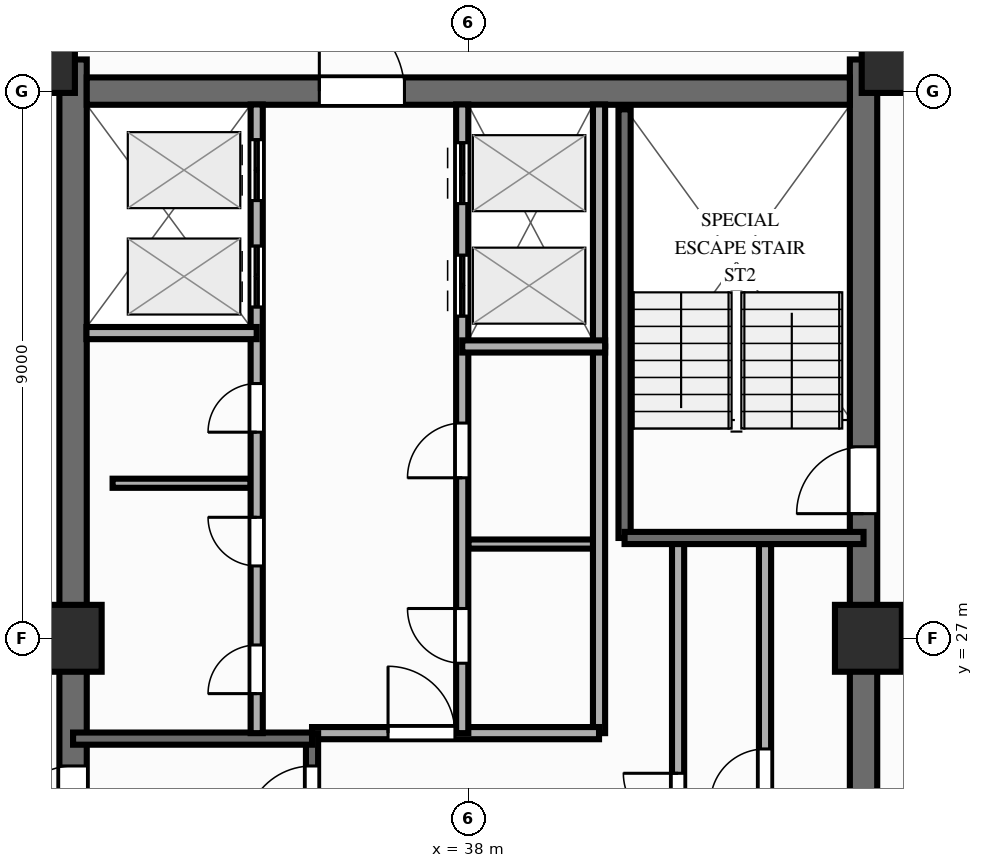
"""IFC4 building model, lengths in metres.
Left out: names, types, materials, properties, quantities, classifications, styles, units other than length and angle.
Written with IfcOpenShell. Run it as: python <this file> out.ifc"""

import sys

from ifc_helpers import new_model, si_unit, direction, frame, frame_2d, origin, origin_2d, place, context, subcontext, project, spatial, rectangle, extrude, source, transform, mapped, element, fill, save


model = new_model("IFC4")
c1 = context("Model", 3, precision=1e-05, world=origin(), true_north=direction((0.0, 1.0)))
c2 = subcontext(c1, "Body", "Model", "MODEL_VIEW")
j1 = project(units=[si_unit("LENGTHUNIT", "METRE"), si_unit("PLANEANGLEUNIT", "RADIAN")], contexts=[c1])
p1 = place(None, origin())
s1 = spatial("IfcSite", under=j1, at=p1, CompositionType="ELEMENT")
p2 = place(p1, origin())
s2 = spatial("IfcBuilding", under=s1, at=p2, CompositionType="ELEMENT")
p3 = place(p2, frame((0.0, 0.0, 179.8)))
s3 = spatial("IfcBuildingStorey", under=s2, at=p3, CompositionType="ELEMENT", Elevation=179.8)
p4 = place(p3, frame((31.5, 17.48, 0.0), z_axis=(0.0, 0.0, 1.0), x_axis=(0.0, 1.0, 0.0)))
e1 = element("IfcWall", 1, at=p4, inside=s3, PredefinedType="SHEAR", context=c2, shape_type="SweptSolid", body=[
    extrude(rectangle(XDim=19.04, YDim=0.45, at=frame_2d((9.52, 0.0))), origin(), (0.0, 0.0, 1.0), 3.0),
])
p5 = place(p4, frame((6.32, 0.0, 0.0)))
e2 = element("IfcOpeningElement", 2, at=p5, cuts=e1, PredefinedType="OPENING", context=c2, shape_type="SweptSolid", body=[
    extrude(rectangle(XDim=1.1, YDim=2.15, at=frame_2d((0.55, 1.075))), frame((0.0, 0.237, 0.0), z_axis=(0.0, -1.0, 0.0), x_axis=(1.0, 0.0, 0.0)), (0.0, 0.0, 1.0), 0.474),
])
p6 = place(p3, frame((44.5, 17.48, 0.0), z_axis=(0.0, 0.0, 1.0), x_axis=(0.0, 1.0, 0.0)))
e3 = element("IfcWall", 3, at=p6, inside=s3, PredefinedType="SHEAR", context=c2, shape_type="SweptSolid", body=[
    extrude(rectangle(XDim=19.04, YDim=0.45, at=frame_2d((9.52, 0.0))), origin(), (0.0, 0.0, 1.0), 3.0),
])
p7 = place(p6, frame((12.67, 0.0, 0.0), z_axis=(0.0, 0.0, 1.0), x_axis=(-1.0, 0.0, 0.0)))
e4 = element("IfcOpeningElement", 4, at=p7, cuts=e3, PredefinedType="OPENING", context=c2, shape_type="SweptSolid", body=[
    extrude(rectangle(XDim=1.1, YDim=2.15, at=frame_2d((0.55, 1.075))), frame((0.0, 0.237, 0.0), z_axis=(0.0, -1.0, 0.0), x_axis=(1.0, 0.0, 0.0)), (0.0, 0.0, 1.0), 0.474),
])
p8 = place(p3, frame((31.725, 36.0, 0.0), z_axis=(0.0, 0.0, 1.0), x_axis=(1.0, 0.0, 0.0)))
e5 = element("IfcWall", 5, at=p8, inside=s3, PredefinedType="SHEAR", context=c2, shape_type="SweptSolid", body=[
    extrude(rectangle(XDim=12.55, YDim=0.45, at=frame_2d((6.275, 0.0))), origin(), (0.0, 0.0, 1.0), 3.0),
])
p9 = place(p8, frame((5.225, 0.0, 0.0), z_axis=(0.0, 0.0, 1.0), x_axis=(-1.0, 0.0, 0.0)))
e6 = element("IfcOpeningElement", 6, at=p9, cuts=e5, PredefinedType="OPENING", context=c2, shape_type="SweptSolid", body=[
    extrude(rectangle(XDim=1.4, YDim=2.15, at=frame_2d((0.7, 1.075))), frame((0.0, 0.237, 0.0), z_axis=(0.0, -1.0, 0.0), x_axis=(1.0, 0.0, 0.0)), (0.0, 0.0, 1.0), 0.474),
])
m1 = source(origin(), c2, "Body", "SweptSolid", [
    extrude(rectangle(XDim=1.1, YDim=1.1, at=origin_2d()), origin(), (0.0, 0.0, 1.0), 3.0),
])
for number, where, z_axis, x_axis in (
    (7, (30.98, 36.52, 0.0), (0.0, 0.0, 1.0), (1.0, 0.0, 0.0)),
    (8, (45.02, 36.52, 0.0), (0.0, 0.0, 1.0), (1.0, 0.0, 0.0)),
    (9, (31.42, 27.0, 0.0), (0.0, 0.0, 1.0), (1.0, 0.0, 0.0)),
    (10, (44.58, 27.0, 0.0), (0.0, 0.0, 1.0), (1.0, 0.0, 0.0)),
):
    element("IfcColumn", number, at=place(p3, frame(where, z_axis=z_axis, x_axis=x_axis)), inside=s3, PredefinedType="COLUMN", context=c2, shape_type="MappedRepresentation", body=[
        mapped(m1, transform((0.0, 0.0, 0.0), scale=1.0)),
    ])
p10 = place(p3, frame((32.15, 29.55, 0.0), z_axis=(0.0, 0.0, 1.0), x_axis=(1.0, 0.0, 0.0)))
e11 = element("IfcWall", 11, at=p10, inside=s3, PredefinedType="PARTITIONING", context=c2, shape_type="SweptSolid", body=[
    extrude(rectangle(XDim=2.27, YDim=0.15, at=frame_2d((1.135, 0.0))), origin(), (0.0, 0.0, 1.0), 2.79),
])
p11 = place(p3, frame((38.0, 28.55, 0.0), z_axis=(0.0, 0.0, 1.0), x_axis=(1.0, 0.0, 0.0)))
e12 = element("IfcWall", 12, at=p11, inside=s3, PredefinedType="PARTITIONING", context=c2, shape_type="SweptSolid", body=[
    extrude(rectangle(XDim=2.2, YDim=0.15, at=frame_2d((1.1, 0.0))), origin(), (0.0, 0.0, 1.0), 2.14),
])
p12 = place(p3, frame((42.88, 21.08, 0.0), z_axis=(0.0, 0.0, 1.0), x_axis=(0.0, 1.0, 0.0)))
e13 = element("IfcWall", 13, at=p12, inside=s3, PredefinedType="PARTITIONING", context=c2, shape_type="SweptSolid", body=[
    extrude(rectangle(XDim=7.47, YDim=0.2, at=frame_2d((3.735, 0.0))), origin(), (0.0, 0.0, 1.0), 2.79),
])
p13 = place(p12, frame((3.2, 0.0, 0.0)))
e14 = element("IfcOpeningElement", 14, at=p13, cuts=e13, PredefinedType="OPENING", context=c2, shape_type="SweptSolid", body=[
    extrude(rectangle(XDim=0.9, YDim=2.1, at=frame_2d((0.45, 1.05))), frame((0.0, 0.112, 0.0), z_axis=(0.0, -1.0, 0.0), x_axis=(1.0, 0.0, 0.0)), (0.0, 0.0, 1.0), 0.224),
])
p14 = place(p3, frame((41.45, 21.08, 0.0), z_axis=(0.0, 0.0, 1.0), x_axis=(0.0, 1.0, 0.0)))
e15 = element("IfcWall", 15, at=p14, inside=s3, PredefinedType="PARTITIONING", context=c2, shape_type="SweptSolid", body=[
    extrude(rectangle(XDim=7.52, YDim=0.2, at=frame_2d((3.76, 0.0))), origin(), (0.0, 0.0, 1.0), 2.79),
])
p15 = place(p14, frame((2.8, 0.0, 0.0)))
e16 = element("IfcOpeningElement", 16, at=p15, cuts=e15, PredefinedType="OPENING", context=c2, shape_type="SweptSolid", body=[
    extrude(rectangle(XDim=0.9, YDim=2.1, at=frame_2d((0.45, 1.05))), frame((0.0, 0.112, 0.0), z_axis=(0.0, -1.0, 0.0), x_axis=(1.0, 0.0, 0.0)), (0.0, 0.0, 1.0), 0.224),
])
p16 = place(p3, frame((40.15, 25.44, 0.0), z_axis=(0.0, 0.0, 1.0), x_axis=(0.0, 1.0, 0.0)))
e17 = element("IfcWall", 17, at=p16, inside=s3, PredefinedType="PARTITIONING", context=c2, shape_type="SweptSolid", body=[
    extrude(rectangle(XDim=6.36, YDim=0.2, at=frame_2d((3.18, 0.0))), origin(), (0.0, 0.0, 1.0), 2.79),
])
p17 = place(p3, frame((40.15, 31.8, 0.0), z_axis=(0.0, 0.0, 1.0), x_axis=(0.0, 1.0, 0.0)))
e18 = element("IfcWall", 18, at=p17, inside=s3, PredefinedType="PARTITIONING", context=c2, shape_type="SweptSolid", body=[
    extrude(rectangle(XDim=3.98, YDim=0.2, at=frame_2d((1.99, 0.0))), origin(), (0.0, 0.0, 1.0), 2.79),
])
p18 = place(p3, frame((35.43, 25.44, 0.0), z_axis=(0.0, 0.0, 1.0), x_axis=(1.0, 0.0, 0.0)))
e19 = element("IfcWall", 19, at=p18, inside=s3, PredefinedType="PARTITIONING", context=c2, shape_type="SweptSolid", body=[
    extrude(rectangle(XDim=4.72, YDim=0.2, at=frame_2d((2.36, 0.0))), origin(), (0.0, 0.0, 1.0), 2.79),
])
p19 = place(p18, frame((1.25, 0.0, 0.0)))
e20 = element("IfcOpeningElement", 20, at=p19, cuts=e19, PredefinedType="OPENING", context=c2, shape_type="SweptSolid", body=[
    extrude(rectangle(XDim=1.1, YDim=2.15, at=frame_2d((0.55, 1.075))), frame((0.0, 0.112, 0.0), z_axis=(0.0, -1.0, 0.0), x_axis=(1.0, 0.0, 0.0)), (0.0, 0.0, 1.0), 0.224),
])
p20 = place(p3, frame((35.43, 18.22, 0.0), z_axis=(0.0, 0.0, 1.0), x_axis=(0.0, 1.0, 0.0)))
e21 = element("IfcWall", 21, at=p20, inside=s3, PredefinedType="SOLIDWALL", context=c2, shape_type="SweptSolid", body=[
    extrude(rectangle(XDim=7.22, YDim=0.2, at=frame_2d((3.61, 0.0))), origin(), (0.0, 0.0, 1.0), 2.79),
])
p21 = place(p20, frame((6.68, 0.0, 0.0), z_axis=(0.0, 0.0, 1.0), x_axis=(-1.0, 0.0, 0.0)))
e22 = element("IfcOpeningElement", 22, at=p21, cuts=e21, PredefinedType="OPENING", context=c2, shape_type="SweptSolid", body=[
    extrude(rectangle(XDim=1.1, YDim=2.15, at=frame_2d((0.55, 1.075))), frame((0.0, 0.112, 0.0), z_axis=(0.0, -1.0, 0.0), x_axis=(1.0, 0.0, 0.0)), (0.0, 0.0, 1.0), 0.224),
])
p22 = place(p3, frame((31.5, 25.35, 0.0), z_axis=(0.0, 0.0, 1.0), x_axis=(1.0, 0.0, 0.0)))
e23 = element("IfcWall", 23, at=p22, inside=s3, PredefinedType="SOLIDWALL", context=c2, shape_type="SweptSolid", body=[
    extrude(rectangle(XDim=3.93, YDim=0.2, at=frame_2d((1.965, 0.0))), origin(), (0.0, 0.0, 1.0), 2.79),
])
p23 = place(p3, frame((40.57, 28.65, 0.0), z_axis=(0.0, 0.0, 1.0), x_axis=(0.0, 1.0, 0.0)))
e24 = element("IfcWall", 24, at=p23, inside=s3, PredefinedType="SOLIDWALL", context=c2, shape_type="SweptSolid", body=[
    extrude(rectangle(XDim=7.05, YDim=0.2, at=frame_2d((3.525, 0.0))), origin(), (0.0, 0.0, 1.0), 2.79),
])
p24 = place(p3, frame((40.57, 28.65, 0.0), z_axis=(0.0, 0.0, 1.0), x_axis=(1.0, 0.0, 0.0)))
e25 = element("IfcWall", 25, at=p24, inside=s3, PredefinedType="SOLIDWALL", context=c2, shape_type="SweptSolid", body=[
    extrude(rectangle(XDim=3.93, YDim=0.2, at=frame_2d((1.965, 0.0))), origin(), (0.0, 0.0, 1.0), 2.79),
])
p25 = place(p3, frame((34.52, 25.44, 0.0), z_axis=(0.0, 0.0, 1.0), x_axis=(0.0, 1.0, 0.0)))
e26 = element("IfcWall", 26, at=p25, inside=s3, PredefinedType="PARTITIONING", context=c2, shape_type="SweptSolid", body=[
    extrude(rectangle(XDim=10.34, YDim=0.2, at=frame_2d((5.17, 0.0))), origin(), (0.0, 0.0, 1.0), 2.79),
])
p26 = place(p25, frame((0.65, 0.0, 0.0)))
e27 = element("IfcOpeningElement", 27, at=p26, cuts=e26, PredefinedType="OPENING", context=c2, shape_type="SweptSolid", body=[
    extrude(rectangle(XDim=0.8, YDim=2.05, at=frame_2d((0.4, 1.025))), frame((0.0, 0.112, 0.0), z_axis=(0.0, -1.0, 0.0), x_axis=(1.0, 0.0, 0.0)), (0.0, 0.0, 1.0), 0.224),
])
p27 = place(p25, frame((2.75, 0.0, 0.0)))
e28 = element("IfcOpeningElement", 28, at=p27, cuts=e26, PredefinedType="OPENING", context=c2, shape_type="SweptSolid", body=[
    extrude(rectangle(XDim=0.8, YDim=2.05, at=frame_2d((0.4, 1.025))), frame((0.0, 0.112, 0.0), z_axis=(0.0, -1.0, 0.0), x_axis=(1.0, 0.0, 0.0)), (0.0, 0.0, 1.0), 0.224),
])
p28 = place(p25, frame((4.95, 0.0, 0.0)))
e29 = element("IfcOpeningElement", 29, at=p28, cuts=e26, PredefinedType="OPENING", context=c2, shape_type="SweptSolid", body=[
    extrude(rectangle(XDim=0.8, YDim=2.05, at=frame_2d((0.4, 1.025))), frame((0.0, 0.112, 0.0), z_axis=(0.0, -1.0, 0.0), x_axis=(1.0, 0.0, 0.0)), (0.0, 0.0, 1.0), 0.224),
])
p29 = place(p25, frame((7.01, 0.0, 0.0)))
e30 = element("IfcOpeningElement", 30, at=p29, cuts=e26, PredefinedType="OPENING", context=c2, shape_type="SweptSolid", body=[
    extrude(rectangle(XDim=1.0, YDim=2.15, at=frame_2d((0.5, 1.075))), frame((0.0, 0.112, 0.0), z_axis=(0.0, -1.0, 0.0), x_axis=(1.0, 0.0, 0.0)), (0.0, 0.0, 1.0), 0.224),
])
p30 = place(p25, frame((8.76, 0.0, 0.0)))
e31 = element("IfcOpeningElement", 31, at=p30, cuts=e26, PredefinedType="OPENING", context=c2, shape_type="SweptSolid", body=[
    extrude(rectangle(XDim=1.0, YDim=2.15, at=frame_2d((0.5, 1.075))), frame((0.0, 0.112, 0.0), z_axis=(0.0, -1.0, 0.0), x_axis=(1.0, 0.0, 0.0)), (0.0, 0.0, 1.0), 0.224),
])
p31 = place(p3, frame((31.72, 32.02, 0.0), z_axis=(0.0, 0.0, 1.0), x_axis=(1.0, 0.0, 0.0)))
e32 = element("IfcWall", 32, at=p31, inside=s3, PredefinedType="PARTITIONING", context=c2, shape_type="SweptSolid", body=[
    extrude(rectangle(XDim=2.8, YDim=0.2, at=frame_2d((1.4, 0.0))), origin(), (0.0, 0.0, 1.0), 2.79),
])
p32 = place(p3, frame((37.9, 25.44, 0.0), z_axis=(0.0, 0.0, 1.0), x_axis=(0.0, 1.0, 0.0)))
e33 = element("IfcWall", 33, at=p32, inside=s3, PredefinedType="PARTITIONING", context=c2, shape_type="SweptSolid", body=[
    extrude(rectangle(XDim=10.34, YDim=0.2, at=frame_2d((5.17, 0.0))), origin(), (0.0, 0.0, 1.0), 2.79),
])
p33 = place(p32, frame((1.15, 0.0, 0.0)))
e34 = element("IfcOpeningElement", 34, at=p33, cuts=e33, PredefinedType="OPENING", context=c2, shape_type="SweptSolid", body=[
    extrude(rectangle(XDim=0.9, YDim=2.1, at=frame_2d((0.45, 1.05))), frame((0.0, 0.112, 0.0), z_axis=(0.0, -1.0, 0.0), x_axis=(1.0, 0.0, 0.0)), (0.0, 0.0, 1.0), 0.224),
])
p34 = place(p32, frame((4.2, 0.0, 0.0)))
e35 = element("IfcOpeningElement", 35, at=p34, cuts=e33, PredefinedType="OPENING", context=c2, shape_type="SweptSolid", body=[
    extrude(rectangle(XDim=0.9, YDim=2.1, at=frame_2d((0.45, 1.05))), frame((0.0, 0.112, 0.0), z_axis=(0.0, -1.0, 0.0), x_axis=(1.0, 0.0, 0.0)), (0.0, 0.0, 1.0), 0.224),
])
p35 = place(p32, frame((6.86, 0.0, 0.0)))
e36 = element("IfcOpeningElement", 36, at=p35, cuts=e33, PredefinedType="OPENING", context=c2, shape_type="SweptSolid", body=[
    extrude(rectangle(XDim=1.0, YDim=2.15, at=frame_2d((0.5, 1.075))), frame((0.0, 0.112, 0.0), z_axis=(0.0, -1.0, 0.0), x_axis=(1.0, 0.0, 0.0)), (0.0, 0.0, 1.0), 0.224),
])
p36 = place(p32, frame((8.71, 0.0, 0.0)))
e37 = element("IfcOpeningElement", 37, at=p36, cuts=e33, PredefinedType="OPENING", context=c2, shape_type="SweptSolid", body=[
    extrude(rectangle(XDim=1.0, YDim=2.15, at=frame_2d((0.5, 1.075))), frame((0.0, 0.112, 0.0), z_axis=(0.0, -1.0, 0.0), x_axis=(1.0, 0.0, 0.0)), (0.0, 0.0, 1.0), 0.224),
])
p37 = place(p3, frame((37.9, 31.8, 0.0), z_axis=(0.0, 0.0, 1.0), x_axis=(1.0, 0.0, 0.0)))
e38 = element("IfcWall", 38, at=p37, inside=s3, PredefinedType="PARTITIONING", context=c2, shape_type="SweptSolid", body=[
    extrude(rectangle(XDim=2.35, YDim=0.2, at=frame_2d((1.175, 0.0))), origin(), (0.0, 0.0, 1.0), 2.79),
])
m2 = source(origin(), c2, "Body", "SweptSolid", [
    extrude(rectangle(XDim=1.1, YDim=2.15, at=frame_2d((0.55, 1.075))), frame((0.0, 0.025, 0.0), z_axis=(0.0, -1.0, 0.0), x_axis=(1.0, 0.0, 0.0)), (0.0, 0.0, 1.0), 0.05),
])
p38 = place(p5, origin())
e39 = element("IfcDoor", 39, at=p38, inside=s3, OperationType="SINGLE_SWING_LEFT", PredefinedType="DOOR", context=c2, shape_type="MappedRepresentation", body=[
    mapped(m2, transform((0.0, 0.0, 0.0), scale=1.0)),
])
fill(e2, e39)
p39 = place(p7, origin())
e40 = element("IfcDoor", 40, at=p39, inside=s3, OperationType="SINGLE_SWING_RIGHT", PredefinedType="DOOR", context=c2, shape_type="MappedRepresentation", body=[
    mapped(m2, transform((0.0, 0.0, 0.0), scale=1.0)),
])
fill(e4, e40)
m3 = source(origin(), c2, "Body", "SweptSolid", [
    extrude(rectangle(XDim=1.4, YDim=2.15, at=frame_2d((0.7, 1.075))), frame((0.0, 0.025, 0.0), z_axis=(0.0, -1.0, 0.0), x_axis=(1.0, 0.0, 0.0)), (0.0, 0.0, 1.0), 0.05),
])
p40 = place(p9, origin())
e41 = element("IfcDoor", 41, at=p40, inside=s3, OperationType="SINGLE_SWING_RIGHT", PredefinedType="DOOR", context=c2, shape_type="MappedRepresentation", body=[
    mapped(m3, transform((0.0, 0.0, 0.0), scale=1.0)),
])
fill(e6, e41)
m4 = source(origin(), c2, "Body", "SweptSolid", [
    extrude(rectangle(XDim=0.9, YDim=2.1, at=frame_2d((0.45, 1.05))), frame((0.0, 0.025, 0.0), z_axis=(0.0, -1.0, 0.0), x_axis=(1.0, 0.0, 0.0)), (0.0, 0.0, 1.0), 0.05),
])
p41 = place(p13, origin())
e42 = element("IfcDoor", 42, at=p41, inside=s3, OperationType="SINGLE_SWING_LEFT", PredefinedType="DOOR", context=c2, shape_type="MappedRepresentation", body=[
    mapped(m4, transform((0.0, 0.0, 0.0), scale=1.0)),
])
fill(e14, e42)
p42 = place(p15, origin())
e43 = element("IfcDoor", 43, at=p42, inside=s3, OperationType="SINGLE_SWING_RIGHT", PredefinedType="DOOR", context=c2, shape_type="MappedRepresentation", body=[
    mapped(m4, transform((0.0, 0.0, 0.0), scale=1.0)),
])
fill(e16, e43)
p43 = place(p19, origin())
e44 = element("IfcDoor", 44, at=p43, inside=s3, OperationType="SINGLE_SWING_LEFT", PredefinedType="DOOR", context=c2, shape_type="MappedRepresentation", body=[
    mapped(m2, transform((0.0, 0.0, 0.0), scale=1.0)),
])
fill(e20, e44)
p44 = place(p21, origin())
e45 = element("IfcDoor", 45, at=p44, inside=s3, OperationType="SINGLE_SWING_RIGHT", PredefinedType="DOOR", context=c2, shape_type="MappedRepresentation", body=[
    mapped(m2, transform((0.0, 0.0, 0.0), scale=1.0)),
])
fill(e22, e45)
m5 = source(origin(), c2, "Body", "SweptSolid", [
    extrude(rectangle(XDim=0.8, YDim=2.05, at=frame_2d((0.4, 1.025))), frame((0.0, 0.025, 0.0), z_axis=(0.0, -1.0, 0.0), x_axis=(1.0, 0.0, 0.0)), (0.0, 0.0, 1.0), 0.05),
])
p45 = place(p26, origin())
e46 = element("IfcDoor", 46, at=p45, inside=s3, OperationType="SINGLE_SWING_LEFT", PredefinedType="DOOR", context=c2, shape_type="MappedRepresentation", body=[
    mapped(m5, transform((0.0, 0.0, 0.0), scale=1.0)),
])
fill(e27, e46)
p46 = place(p27, origin())
e47 = element("IfcDoor", 47, at=p46, inside=s3, OperationType="SINGLE_SWING_RIGHT", PredefinedType="DOOR", context=c2, shape_type="MappedRepresentation", body=[
    mapped(m5, transform((0.0, 0.0, 0.0), scale=1.0)),
])
fill(e28, e47)
p47 = place(p28, origin())
e48 = element("IfcDoor", 48, at=p47, inside=s3, OperationType="SINGLE_SWING_LEFT", PredefinedType="DOOR", context=c2, shape_type="MappedRepresentation", body=[
    mapped(m5, transform((0.0, 0.0, 0.0), scale=1.0)),
])
fill(e29, e48)
m6 = source(origin(), c2, "Body", "SweptSolid", [
    extrude(rectangle(XDim=1.0, YDim=2.15, at=frame_2d((0.5, 1.075))), frame((0.0, 0.025, 0.0), z_axis=(0.0, -1.0, 0.0), x_axis=(1.0, 0.0, 0.0)), (0.0, 0.0, 1.0), 0.05),
])
p48 = place(p29, origin())
e49 = element("IfcDoor", 49, at=p48, inside=s3, OperationType="DOUBLE_DOOR_SLIDING", PredefinedType="DOOR", context=c2, shape_type="MappedRepresentation", body=[
    mapped(m6, transform((0.0, 0.0, 0.0), scale=1.0)),
])
fill(e30, e49)
p49 = place(p30, origin())
e50 = element("IfcDoor", 50, at=p49, inside=s3, OperationType="DOUBLE_DOOR_SLIDING", PredefinedType="DOOR", context=c2, shape_type="MappedRepresentation", body=[
    mapped(m6, transform((0.0, 0.0, 0.0), scale=1.0)),
])
fill(e31, e50)
p50 = place(p33, origin())
e51 = element("IfcDoor", 51, at=p50, inside=s3, OperationType="SINGLE_SWING_RIGHT", PredefinedType="DOOR", context=c2, shape_type="MappedRepresentation", body=[
    mapped(m4, transform((0.0, 0.0, 0.0), scale=1.0)),
])
fill(e34, e51)
p51 = place(p34, origin())
e52 = element("IfcDoor", 52, at=p51, inside=s3, OperationType="SINGLE_SWING_LEFT", PredefinedType="DOOR", context=c2, shape_type="MappedRepresentation", body=[
    mapped(m4, transform((0.0, 0.0, 0.0), scale=1.0)),
])
fill(e35, e52)
p52 = place(p35, origin())
e53 = element("IfcDoor", 53, at=p52, inside=s3, OperationType="DOUBLE_DOOR_SLIDING", PredefinedType="DOOR", context=c2, shape_type="MappedRepresentation", body=[
    mapped(m6, transform((0.0, 0.0, 0.0), scale=1.0)),
])
fill(e36, e53)
p53 = place(p36, origin())
e54 = element("IfcDoor", 54, at=p53, inside=s3, OperationType="DOUBLE_DOOR_SLIDING", PredefinedType="DOOR", context=c2, shape_type="MappedRepresentation", body=[
    mapped(m6, transform((0.0, 0.0, 0.0), scale=1.0)),
])
fill(e37, e54)
save(model, sys.argv[1])
